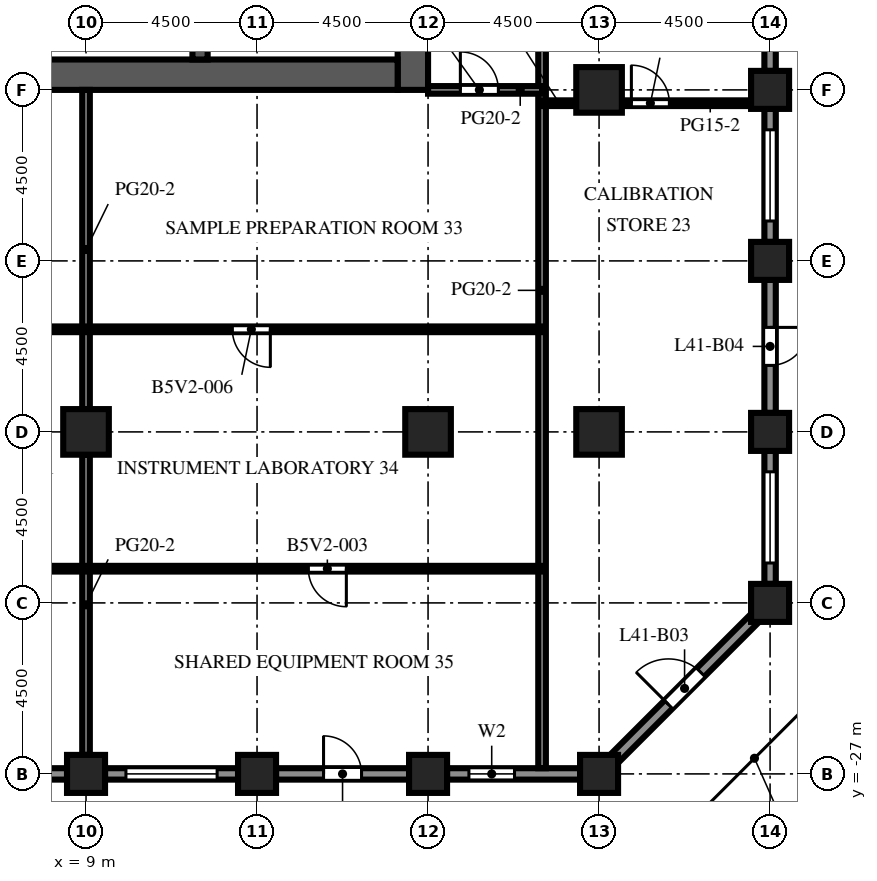
"""IFC4 building model, lengths in metres.
Left out: names, types, materials, properties, quantities, classifications, styles, units other than length and angle.
Written with IfcOpenShell. Run it as: python <this file> out.ifc"""

import sys

from ifc_helpers import new_model, si_unit, direction, frame, frame_2d, origin, origin_2d, place, context, subcontext, project, spatial, rectangle, extrude, element, fill, save


model = new_model("IFC4")
c1 = context("Model", 3, precision=1e-05, world=origin(), true_north=direction((0.0, 1.0)))
c2 = subcontext(c1, "Body", "Model", "MODEL_VIEW")
j1 = project(units=[si_unit("LENGTHUNIT", "METRE"), si_unit("PLANEANGLEUNIT", "RADIAN")], contexts=[c1])
p1 = place(None, origin())
s1 = spatial("IfcSite", under=j1, at=p1, CompositionType="ELEMENT")
p2 = place(p1, origin())
s2 = spatial("IfcBuilding", under=s1, at=p2, CompositionType="ELEMENT")
p3 = place(p2, frame((0.0, 0.0, 181.4)))
s3 = spatial("IfcBuildingStorey", under=s2, at=p3, CompositionType="ELEMENT", Elevation=181.4)
for number, where, z_axis, x_axis in (
    (1, (9.0, -27.0, 0.0), (0.0, 0.0, 1.0), (1.0, 0.0, 0.0)),
    (2, (13.5, -27.0, 0.0), (0.0, 0.0, 1.0), (1.0, 0.0, 0.0)),
    (3, (18.0, -27.0, 0.0), (0.0, 0.0, 1.0), (1.0, 0.0, 0.0)),
    (4, (22.5, -27.0, 0.0), (0.0, 0.0, 1.0), (1.0, 0.0, 0.0)),
    (5, (27.0, -22.5, 0.0), (0.0, 0.0, 1.0), (1.0, 0.0, 0.0)),
    (6, (27.0, -18.0, 0.0), (0.0, 0.0, 1.0), (1.0, 0.0, 0.0)),
    (7, (27.0, -13.5, 0.0), (0.0, 0.0, 1.0), (1.0, 0.0, 0.0)),
    (8, (27.0, -9.0, 0.0), (0.0, 0.0, 1.0), (1.0, 0.0, 0.0)),
):
    element("IfcColumn", number, at=place(p3, frame(where, z_axis=z_axis, x_axis=x_axis)), inside=s3, PredefinedType="COLUMN", context=c2, shape_type="SweptSolid", body=[
        extrude(rectangle(XDim=1.0, YDim=1.0, at=origin_2d()), origin(), (0.0, 0.0, 1.0), 4.1),
    ])
for number, where, z_axis, x_axis in (
    (9, (9.0, -18.0, 0.0), (0.0, 0.0, 1.0), (1.0, 0.0, 0.0)),
    (10, (18.0, -18.0, 0.0), (0.0, 0.0, 1.0), (1.0, 0.0, 0.0)),
    (11, (22.5, -18.0, 0.0), (0.0, 0.0, 1.0), (1.0, 0.0, 0.0)),
    (12, (22.5, -9.0, 0.0), (0.0, 0.0, 1.0), (1.0, 0.0, 0.0)),
):
    element("IfcColumn", number, at=place(p3, frame(where, z_axis=z_axis, x_axis=x_axis)), inside=s3, PredefinedType="COLUMN", context=c2, shape_type="SweptSolid", body=[
        extrude(rectangle(XDim=1.2, YDim=1.2, at=origin_2d()), origin(), (0.0, 0.0, 1.0), 4.1),
    ])
p4 = place(p3, frame((17.6, -9.0, 0.0), z_axis=(0.0, 0.0, 1.0), x_axis=(0.0, 1.0, 0.0)))
e13 = element("IfcWall", 13, at=p4, inside=s3, PredefinedType="SHEAR", context=c2, shape_type="SweptSolid", body=[
    extrude(rectangle(XDim=27.5, YDim=0.8, at=frame_2d((13.75, 0.0))), origin(), (0.0, 0.0, 1.0), 4.1),
])
p5 = place(p4, frame((12.55, 0.0, 0.0)))
e14 = element("IfcOpeningElement", 14, at=p5, cuts=e13, PredefinedType="OPENING", context=c2, shape_type="SweptSolid", body=[
    extrude(rectangle(XDim=2.4, YDim=2.4, at=frame_2d((1.2, 1.2))), frame((0.0, 0.41, 0.0), z_axis=(0.0, -1.0, 0.0), x_axis=(1.0, 0.0, 0.0)), (0.0, 0.0, 1.0), 0.82),
])
p6 = place(p4, frame((6.825, 0.0, 0.0)))
e15 = element("IfcOpeningElement", 15, at=p6, cuts=e13, PredefinedType="OPENING", context=c2, shape_type="SweptSolid", body=[
    extrude(rectangle(XDim=1.2, YDim=2.1, at=frame_2d((0.6, 1.05))), frame((0.0, 0.41, 0.0), z_axis=(0.0, -1.0, 0.0), x_axis=(1.0, 0.0, 0.0)), (0.0, 0.0, 1.0), 0.82),
])
p7 = place(p4, frame((19.475, 0.0, 0.0)))
e16 = element("IfcOpeningElement", 16, at=p7, cuts=e13, PredefinedType="OPENING", context=c2, shape_type="SweptSolid", body=[
    extrude(rectangle(XDim=1.2, YDim=2.1, at=frame_2d((0.6, 1.05))), frame((0.0, 0.41, 0.0), z_axis=(0.0, -1.0, 0.0), x_axis=(1.0, 0.0, 0.0)), (0.0, 0.0, 1.0), 0.82),
])
p8 = place(p3, frame((6.8, -8.6, 0.0), z_axis=(0.0, 0.0, 1.0), x_axis=(1.0, 0.0, 0.0)))
e17 = element("IfcWall", 17, at=p8, inside=s3, PredefinedType="SHEAR", context=c2, shape_type="SweptSolid", body=[
    extrude(rectangle(XDim=10.4, YDim=0.8, at=frame_2d((5.2, 0.0))), origin(), (0.0, 0.0, 1.0), 4.1),
])
p9 = place(p3, frame((12.0, -8.2, 0.0), z_axis=(0.0, 0.0, 1.0), x_axis=(0.0, 1.0, 0.0)))
e18 = element("IfcWall", 18, at=p9, inside=s3, PredefinedType="SHEAR", context=c2, shape_type="SweptSolid", body=[
    extrude(rectangle(XDim=7.5, YDim=0.4, at=frame_2d((3.75, 0.0))), origin(), (0.0, 0.0, 1.0), 4.1),
])
p10 = place(p3, frame((8.5, -27.0, 0.0), z_axis=(0.0, 0.0, 1.0), x_axis=(-1.0, 0.0, 0.0)))
e19 = element("IfcWall", 19, at=p10, inside=s3, PredefinedType="SOLIDWALL", context=c2, shape_type="SweptSolid", body=[
    extrude(rectangle(XDim=3.5, YDim=0.3, at=frame_2d((1.75, 0.0))), origin(), (0.0, 0.0, 1.0), 2.7),
])
p11 = place(p10, frame((0.55, 0.0, 0.8)))
e20 = element("IfcOpeningElement", 20, at=p11, cuts=e19, PredefinedType="OPENING", context=c2, shape_type="SweptSolid", body=[
    extrude(rectangle(XDim=2.4, YDim=1.7, at=frame_2d((1.2, 0.85))), frame((0.0, 0.16, 0.0), z_axis=(0.0, -1.0, 0.0), x_axis=(1.0, 0.0, 0.0)), (0.0, 0.0, 1.0), 0.32),
])
p12 = place(p3, frame((13.0, -27.0, 0.0), z_axis=(0.0, 0.0, 1.0), x_axis=(-1.0, 0.0, 0.0)))
e21 = element("IfcWall", 21, at=p12, inside=s3, PredefinedType="SOLIDWALL", context=c2, shape_type="SweptSolid", body=[
    extrude(rectangle(XDim=3.5, YDim=0.3, at=frame_2d((1.75, 0.0))), origin(), (0.0, 0.0, 1.0), 2.7),
])
p13 = place(p12, frame((0.55, 0.0, 0.8)))
e22 = element("IfcOpeningElement", 22, at=p13, cuts=e21, PredefinedType="OPENING", context=c2, shape_type="SweptSolid", body=[
    extrude(rectangle(XDim=2.4, YDim=1.7, at=frame_2d((1.2, 0.85))), frame((0.0, 0.16, 0.0), z_axis=(0.0, -1.0, 0.0), x_axis=(1.0, 0.0, 0.0)), (0.0, 0.0, 1.0), 0.32),
])
p14 = place(p3, frame((17.5, -27.0, 0.0), z_axis=(0.0, 0.0, 1.0), x_axis=(-1.0, 0.0, 0.0)))
e23 = element("IfcWall", 23, at=p14, inside=s3, PredefinedType="SOLIDWALL", context=c2, shape_type="SweptSolid", body=[
    extrude(rectangle(XDim=3.5, YDim=0.3, at=frame_2d((1.75, 0.0))), origin(), (0.0, 0.0, 1.0), 2.7),
])
p15 = place(p14, frame((1.25, 0.0, 0.0)))
e24 = element("IfcOpeningElement", 24, at=p15, cuts=e23, PredefinedType="OPENING", context=c2, shape_type="SweptSolid", body=[
    extrude(rectangle(XDim=1.0, YDim=2.2, at=frame_2d((0.5, 1.1))), frame((0.0, 0.16, 0.0), z_axis=(0.0, -1.0, 0.0), x_axis=(1.0, 0.0, 0.0)), (0.0, 0.0, 1.0), 0.32),
])
p16 = place(p3, frame((22.0, -27.0, 0.0), z_axis=(0.0, 0.0, 1.0), x_axis=(-1.0, 0.0, 0.0)))
e25 = element("IfcWall", 25, at=p16, inside=s3, PredefinedType="SOLIDWALL", context=c2, shape_type="SweptSolid", body=[
    extrude(rectangle(XDim=3.5, YDim=0.3, at=frame_2d((1.75, 0.0))), origin(), (0.0, 0.0, 1.0), 2.7),
])
p17 = place(p16, frame((1.725, 0.0, 0.8)))
e26 = element("IfcOpeningElement", 26, at=p17, cuts=e25, PredefinedType="OPENING", context=c2, shape_type="SweptSolid", body=[
    extrude(rectangle(XDim=1.2, YDim=1.7, at=frame_2d((0.6, 0.85))), frame((0.0, 0.16, 0.0), z_axis=(0.0, -1.0, 0.0), x_axis=(1.0, 0.0, 0.0)), (0.0, 0.0, 1.0), 0.32),
])
p18 = place(p3, frame((26.606, -22.894, 0.0), z_axis=(0.0, 0.0, 1.0), x_axis=(-0.707106781187, -0.707106781187, 0.0)))
e27 = element("IfcWall", 27, at=p18, inside=s3, PredefinedType="SOLIDWALL", context=c2, shape_type="SweptSolid", body=[
    extrude(rectangle(XDim=5.25, YDim=0.3, at=frame_2d((2.625, 0.0))), origin(), (0.0, 0.0, 1.0), 2.7),
])
p19 = place(p18, frame((2.025, 0.0, 0.0)))
e28 = element("IfcOpeningElement", 28, at=p19, cuts=e27, PredefinedType="OPENING", context=c2, shape_type="SweptSolid", body=[
    extrude(rectangle(XDim=1.2, YDim=2.2, at=frame_2d((0.6, 1.1))), frame((0.0, 0.16, 0.0), z_axis=(0.0, -1.0, 0.0), x_axis=(1.0, 0.0, 0.0)), (0.0, 0.0, 1.0), 0.32),
])
p20 = place(p3, frame((27.0, -18.5, 0.0), z_axis=(0.0, 0.0, 1.0), x_axis=(0.0, -1.0, 0.0)))
e29 = element("IfcWall", 29, at=p20, inside=s3, PredefinedType="SOLIDWALL", context=c2, shape_type="SweptSolid", body=[
    extrude(rectangle(XDim=3.5, YDim=0.3, at=frame_2d((1.75, 0.0))), origin(), (0.0, 0.0, 1.0), 2.7),
])
p21 = place(p20, frame((0.55, 0.0, 0.8)))
e30 = element("IfcOpeningElement", 30, at=p21, cuts=e29, PredefinedType="OPENING", context=c2, shape_type="SweptSolid", body=[
    extrude(rectangle(XDim=2.4, YDim=1.7, at=frame_2d((1.2, 0.85))), frame((0.0, 0.16, 0.0), z_axis=(0.0, -1.0, 0.0), x_axis=(1.0, 0.0, 0.0)), (0.0, 0.0, 1.0), 0.32),
])
p22 = place(p3, frame((27.0, -14.0, 0.0), z_axis=(0.0, 0.0, 1.0), x_axis=(0.0, -1.0, 0.0)))
e31 = element("IfcWall", 31, at=p22, inside=s3, PredefinedType="SOLIDWALL", context=c2, shape_type="SweptSolid", body=[
    extrude(rectangle(XDim=3.5, YDim=0.3, at=frame_2d((1.75, 0.0))), origin(), (0.0, 0.0, 1.0), 2.7),
])
p23 = place(p22, frame((1.25, 0.0, 0.0)))
e32 = element("IfcOpeningElement", 32, at=p23, cuts=e31, PredefinedType="OPENING", context=c2, shape_type="SweptSolid", body=[
    extrude(rectangle(XDim=1.0, YDim=2.2, at=frame_2d((0.5, 1.1))), frame((0.0, 0.16, 0.0), z_axis=(0.0, -1.0, 0.0), x_axis=(1.0, 0.0, 0.0)), (0.0, 0.0, 1.0), 0.32),
])
p24 = place(p3, frame((27.0, -9.5, 0.0), z_axis=(0.0, 0.0, 1.0), x_axis=(0.0, -1.0, 0.0)))
e33 = element("IfcWall", 33, at=p24, inside=s3, PredefinedType="SOLIDWALL", context=c2, shape_type="SweptSolid", body=[
    extrude(rectangle(XDim=3.5, YDim=0.3, at=frame_2d((1.75, 0.0))), origin(), (0.0, 0.0, 1.0), 2.7),
])
p25 = place(p24, frame((0.55, 0.0, 0.8)))
e34 = element("IfcOpeningElement", 34, at=p25, cuts=e33, PredefinedType="OPENING", context=c2, shape_type="SweptSolid", body=[
    extrude(rectangle(XDim=2.4, YDim=1.7, at=frame_2d((1.2, 0.85))), frame((0.0, 0.16, 0.0), z_axis=(0.0, -1.0, 0.0), x_axis=(1.0, 0.0, 0.0)), (0.0, 0.0, 1.0), 0.32),
])
p26 = place(p3, frame((27.0, -5.0, 0.0), z_axis=(0.0, 0.0, 1.0), x_axis=(0.0, -1.0, 0.0)))
e35 = element("IfcWall", 35, at=p26, inside=s3, PredefinedType="SOLIDWALL", context=c2, shape_type="SweptSolid", body=[
    extrude(rectangle(XDim=3.5, YDim=0.3, at=frame_2d((1.75, 0.0))), origin(), (0.0, 0.0, 1.0), 2.7),
])
p27 = place(p26, frame((0.55, 0.0, 0.8)))
e36 = element("IfcOpeningElement", 36, at=p27, cuts=e35, PredefinedType="OPENING", context=c2, shape_type="SweptSolid", body=[
    extrude(rectangle(XDim=2.4, YDim=1.7, at=frame_2d((1.2, 0.85))), frame((0.0, 0.16, 0.0), z_axis=(0.0, -1.0, 0.0), x_axis=(1.0, 0.0, 0.0)), (0.0, 0.0, 1.0), 0.32),
])
p28 = place(p3, frame((9.0, -26.5, 0.0), z_axis=(0.0, 0.0, 1.0), x_axis=(0.0, 1.0, 0.0)))
e37 = element("IfcWall", 37, at=p28, inside=s3, PredefinedType="PARTITIONING", context=c2, shape_type="SweptSolid", body=[
    extrude(rectangle(XDim=7.9, YDim=0.2, at=frame_2d((3.95, 0.0))), origin(), (0.0, 0.0, 1.0), 3.5),
])
p29 = place(p3, frame((9.0, -17.4, 0.0), z_axis=(0.0, 0.0, 1.0), x_axis=(0.0, 1.0, 0.0)))
e38 = element("IfcWall", 38, at=p29, inside=s3, PredefinedType="PARTITIONING", context=c2, shape_type="SweptSolid", body=[
    extrude(rectangle(XDim=8.4, YDim=0.2, at=frame_2d((4.2, 0.0))), origin(), (0.0, 0.0, 1.0), 3.5),
])
p30 = place(p3, frame((21.0, 3.25, 0.0), z_axis=(0.0, 0.0, 1.0), x_axis=(0.0, -1.0, 0.0)))
e39 = element("IfcWall", 39, at=p30, inside=s3, PredefinedType="PARTITIONING", context=c2, shape_type="SweptSolid", body=[
    extrude(rectangle(XDim=30.1, YDim=0.2, at=frame_2d((15.05, 0.0))), origin(), (0.0, 0.0, 1.0), 3.5),
])
p31 = place(p30, frame((3.95, 0.0, 0.0)))
e40 = element("IfcOpeningElement", 40, at=p31, cuts=e39, PredefinedType="OPENING", context=c2, shape_type="SweptSolid", body=[
    extrude(rectangle(XDim=1.0, YDim=2.1, at=frame_2d((0.5, 1.05))), frame((0.0, 0.11, 0.0), z_axis=(0.0, -1.0, 0.0), x_axis=(1.0, 0.0, 0.0)), (0.0, 0.0, 1.0), 0.22),
])
p32 = place(p3, frame((21.0, -21.6, 0.0), z_axis=(0.0, 0.0, 1.0), x_axis=(-1.0, 0.0, 0.0)))
e41 = element("IfcWall", 41, at=p32, inside=s3, PredefinedType="PARTITIONING", context=c2, shape_type="SweptSolid", body=[
    extrude(rectangle(XDim=34.5, YDim=0.15, at=frame_2d((17.25, 0.0))), origin(), (0.0, 0.0, 1.0), 3.5),
])
p33 = place(p32, frame((28.65, 0.0, 0.0)))
e42 = element("IfcOpeningElement", 42, at=p33, cuts=e41, PredefinedType="OPENING", context=c2, shape_type="SweptSolid", body=[
    extrude(rectangle(XDim=1.0, YDim=2.1, at=frame_2d((0.5, 1.05))), frame((0.0, 0.085, 0.0), z_axis=(0.0, -1.0, 0.0), x_axis=(1.0, 0.0, 0.0)), (0.0, 0.0, 1.0), 0.17),
])
p34 = place(p32, frame((16.4, 0.0, 0.0)))
e43 = element("IfcOpeningElement", 43, at=p34, cuts=e41, PredefinedType="OPENING", context=c2, shape_type="SweptSolid", body=[
    extrude(rectangle(XDim=1.0, YDim=2.1, at=frame_2d((0.5, 1.05))), frame((0.0, 0.085, 0.0), z_axis=(0.0, -1.0, 0.0), x_axis=(1.0, 0.0, 0.0)), (0.0, 0.0, 1.0), 0.17),
])
p35 = place(p32, frame((5.15, 0.0, 0.0)))
e44 = element("IfcOpeningElement", 44, at=p35, cuts=e41, PredefinedType="OPENING", context=c2, shape_type="SweptSolid", body=[
    extrude(rectangle(XDim=1.0, YDim=2.1, at=frame_2d((0.5, 1.05))), frame((0.0, 0.085, 0.0), z_axis=(0.0, -1.0, 0.0), x_axis=(1.0, 0.0, 0.0)), (0.0, 0.0, 1.0), 0.17),
])
p36 = place(p3, frame((21.0, -15.3, 0.0), z_axis=(0.0, 0.0, 1.0), x_axis=(-1.0, 0.0, 0.0)))
e45 = element("IfcWall", 45, at=p36, inside=s3, PredefinedType="PARTITIONING", context=c2, shape_type="SweptSolid", body=[
    extrude(rectangle(XDim=34.5, YDim=0.15, at=frame_2d((17.25, 0.0))), origin(), (0.0, 0.0, 1.0), 3.5),
])
p37 = place(p36, frame((28.9, 0.0, 0.0)))
e46 = element("IfcOpeningElement", 46, at=p37, cuts=e45, PredefinedType="OPENING", context=c2, shape_type="SweptSolid", body=[
    extrude(rectangle(XDim=1.0, YDim=2.1, at=frame_2d((0.5, 1.05))), frame((0.0, 0.085, 0.0), z_axis=(0.0, -1.0, 0.0), x_axis=(1.0, 0.0, 0.0)), (0.0, 0.0, 1.0), 0.17),
])
p38 = place(p36, frame((17.15, 0.0, 0.0)))
e47 = element("IfcOpeningElement", 47, at=p38, cuts=e45, PredefinedType="OPENING", context=c2, shape_type="SweptSolid", body=[
    extrude(rectangle(XDim=1.0, YDim=2.1, at=frame_2d((0.5, 1.05))), frame((0.0, 0.085, 0.0), z_axis=(0.0, -1.0, 0.0), x_axis=(1.0, 0.0, 0.0)), (0.0, 0.0, 1.0), 0.17),
])
p39 = place(p36, frame((7.15, 0.0, 0.0)))
e48 = element("IfcOpeningElement", 48, at=p39, cuts=e45, PredefinedType="OPENING", context=c2, shape_type="SweptSolid", body=[
    extrude(rectangle(XDim=1.0, YDim=2.1, at=frame_2d((0.5, 1.05))), frame((0.0, 0.085, 0.0), z_axis=(0.0, -1.0, 0.0), x_axis=(1.0, 0.0, 0.0)), (0.0, 0.0, 1.0), 0.17),
])
p40 = place(p3, frame((21.0, -9.35, 0.0), z_axis=(0.0, 0.0, 1.0), x_axis=(1.0, 0.0, 0.0)))
e49 = element("IfcWall", 49, at=p40, inside=s3, PredefinedType="PARTITIONING", context=c2, shape_type="SweptSolid", body=[
    extrude(rectangle(XDim=0.9, YDim=0.15, at=frame_2d((0.45, 0.0))), origin(), (0.0, 0.0, 1.0), 3.5),
])
p41 = place(p3, frame((26.5, -9.35, 0.0), z_axis=(0.0, 0.0, 1.0), x_axis=(-1.0, 0.0, 0.0)))
e50 = element("IfcWall", 50, at=p41, inside=s3, PredefinedType="PARTITIONING", context=c2, shape_type="SweptSolid", body=[
    extrude(rectangle(XDim=3.4, YDim=0.15, at=frame_2d((1.7, 0.0))), origin(), (0.0, 0.0, 1.0), 3.5),
])
p42 = place(p41, frame((2.15, 0.0, 0.0)))
e51 = element("IfcOpeningElement", 51, at=p42, cuts=e50, PredefinedType="OPENING", context=c2, shape_type="SweptSolid", body=[
    extrude(rectangle(XDim=1.0, YDim=2.1, at=frame_2d((0.5, 1.05))), frame((0.0, 0.085, 0.0), z_axis=(0.0, -1.0, 0.0), x_axis=(1.0, 0.0, 0.0)), (0.0, 0.0, 1.0), 0.17),
])
p43 = place(p3, frame((21.0, -9.0, 0.0), z_axis=(0.0, 0.0, 1.0), x_axis=(-1.0, 0.0, 0.0)))
e52 = element("IfcWall", 52, at=p43, inside=s3, PredefinedType="PARTITIONING", context=c2, shape_type="SweptSolid", body=[
    extrude(rectangle(XDim=3.0, YDim=0.2, at=frame_2d((1.5, 0.0))), origin(), (0.0, 0.0, 1.0), 3.5),
])
p44 = place(p43, frame((1.15, 0.0, 0.0)))
e53 = element("IfcOpeningElement", 53, at=p44, cuts=e52, PredefinedType="OPENING", context=c2, shape_type="SweptSolid", body=[
    extrude(rectangle(XDim=1.0, YDim=2.1, at=frame_2d((0.5, 1.05))), frame((0.0, 0.11, 0.0), z_axis=(0.0, -1.0, 0.0), x_axis=(1.0, 0.0, 0.0)), (0.0, 0.0, 1.0), 0.22),
])
p45 = place(p13, origin())
e54 = element("IfcWindow", 54, at=p45, inside=s3, PartitioningType="SINGLE_PANEL", PredefinedType="WINDOW", context=c2, shape_type="SweptSolid", body=[
    extrude(rectangle(XDim=2.4, YDim=1.7, at=frame_2d((1.2, 0.85))), frame((0.0, 0.03, 0.0), z_axis=(0.0, -1.0, 0.0), x_axis=(1.0, 0.0, 0.0)), (0.0, 0.0, 1.0), 0.06),
])
fill(e22, e54)
p46 = place(p15, origin())
e55 = element("IfcDoor", 55, at=p46, inside=s3, OperationType="SINGLE_SWING_RIGHT", PredefinedType="DOOR", context=c2, shape_type="SweptSolid", body=[
    extrude(rectangle(XDim=1.0, YDim=2.2, at=frame_2d((0.5, 1.1))), frame((0.0, 0.025, 0.0), z_axis=(0.0, -1.0, 0.0), x_axis=(1.0, 0.0, 0.0)), (0.0, 0.0, 1.0), 0.05),
])
fill(e24, e55)
p47 = place(p17, origin())
e56 = element("IfcWindow", 56, at=p47, inside=s3, PartitioningType="SINGLE_PANEL", PredefinedType="WINDOW", context=c2, shape_type="SweptSolid", body=[
    extrude(rectangle(XDim=1.2, YDim=1.7, at=frame_2d((0.6, 0.85))), frame((0.0, 0.03, 0.0), z_axis=(0.0, -1.0, 0.0), x_axis=(1.0, 0.0, 0.0)), (0.0, 0.0, 1.0), 0.06),
])
fill(e26, e56)
p48 = place(p19, origin())
e57 = element("IfcDoor", 57, at=p48, inside=s3, OperationType="SINGLE_SWING_RIGHT", PredefinedType="DOOR", context=c2, shape_type="SweptSolid", body=[
    extrude(rectangle(XDim=1.2, YDim=2.2, at=frame_2d((0.6, 1.1))), frame((0.0, 0.025, 0.0), z_axis=(0.0, -1.0, 0.0), x_axis=(1.0, 0.0, 0.0)), (0.0, 0.0, 1.0), 0.05),
])
fill(e28, e57)
p49 = place(p21, origin())
e58 = element("IfcWindow", 58, at=p49, inside=s3, PartitioningType="SINGLE_PANEL", PredefinedType="WINDOW", context=c2, shape_type="SweptSolid", body=[
    extrude(rectangle(XDim=2.4, YDim=1.7, at=frame_2d((1.2, 0.85))), frame((0.0, 0.03, 0.0), z_axis=(0.0, -1.0, 0.0), x_axis=(1.0, 0.0, 0.0)), (0.0, 0.0, 1.0), 0.06),
])
fill(e30, e58)
p50 = place(p23, origin())
e59 = element("IfcDoor", 59, at=p50, inside=s3, OperationType="SINGLE_SWING_LEFT", PredefinedType="DOOR", context=c2, shape_type="SweptSolid", body=[
    extrude(rectangle(XDim=1.0, YDim=2.2, at=frame_2d((0.5, 1.1))), frame((0.0, 0.025, 0.0), z_axis=(0.0, -1.0, 0.0), x_axis=(1.0, 0.0, 0.0)), (0.0, 0.0, 1.0), 0.05),
])
fill(e32, e59)
p51 = place(p25, origin())
e60 = element("IfcWindow", 60, at=p51, inside=s3, PartitioningType="SINGLE_PANEL", PredefinedType="WINDOW", context=c2, shape_type="SweptSolid", body=[
    extrude(rectangle(XDim=2.4, YDim=1.7, at=frame_2d((1.2, 0.85))), frame((0.0, 0.03, 0.0), z_axis=(0.0, -1.0, 0.0), x_axis=(1.0, 0.0, 0.0)), (0.0, 0.0, 1.0), 0.06),
])
fill(e34, e60)
p52 = place(p35, origin())
e61 = element("IfcDoor", 61, at=p52, inside=s3, OperationType="SINGLE_SWING_LEFT", PredefinedType="DOOR", context=c2, shape_type="SweptSolid", body=[
    extrude(rectangle(XDim=1.0, YDim=2.1, at=frame_2d((0.5, 1.05))), frame((0.0, 0.025, 0.0), z_axis=(0.0, -1.0, 0.0), x_axis=(1.0, 0.0, 0.0)), (0.0, 0.0, 1.0), 0.05),
])
fill(e44, e61)
p53 = place(p39, origin())
e62 = element("IfcDoor", 62, at=p53, inside=s3, OperationType="SINGLE_SWING_LEFT", PredefinedType="DOOR", context=c2, shape_type="SweptSolid", body=[
    extrude(rectangle(XDim=1.0, YDim=2.1, at=frame_2d((0.5, 1.05))), frame((0.0, 0.025, 0.0), z_axis=(0.0, -1.0, 0.0), x_axis=(1.0, 0.0, 0.0)), (0.0, 0.0, 1.0), 0.05),
])
fill(e48, e62)
p54 = place(p42, origin())
e63 = element("IfcDoor", 63, at=p54, inside=s3, OperationType="SINGLE_SWING_RIGHT", PredefinedType="DOOR", context=c2, shape_type="SweptSolid", body=[
    extrude(rectangle(XDim=1.0, YDim=2.1, at=frame_2d((0.5, 1.05))), frame((0.0, 0.025, 0.0), z_axis=(0.0, -1.0, 0.0), x_axis=(1.0, 0.0, 0.0)), (0.0, 0.0, 1.0), 0.05),
])
fill(e51, e63)
p55 = place(p44, origin())
e64 = element("IfcDoor", 64, at=p55, inside=s3, OperationType="SINGLE_SWING_RIGHT", PredefinedType="DOOR", context=c2, shape_type="SweptSolid", body=[
    extrude(rectangle(XDim=1.0, YDim=2.1, at=frame_2d((0.5, 1.05))), frame((0.0, 0.025, 0.0), z_axis=(0.0, -1.0, 0.0), x_axis=(1.0, 0.0, 0.0)), (0.0, 0.0, 1.0), 0.05),
])
fill(e53, e64)
save(model, sys.argv[1])
